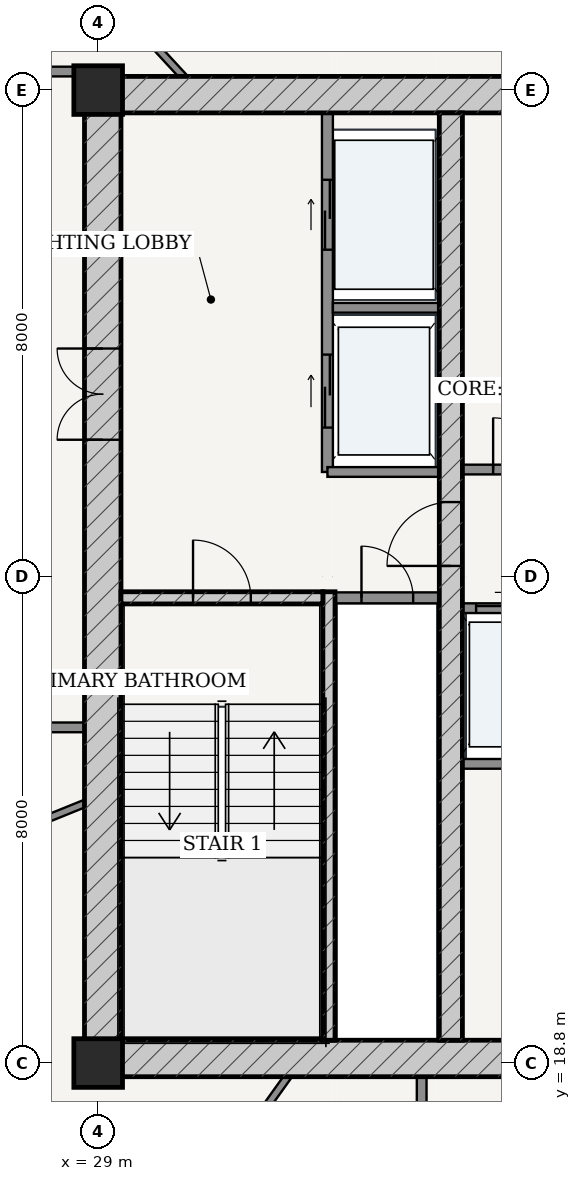
"""IFC4 building model, lengths in metres.
Left out: names, types, materials, properties, quantities, classifications, styles, units other than length and angle.
Written with IfcOpenShell. Run it as: python <this file> out.ifc"""

import sys

from ifc_helpers import new_model, si_unit, direction, frame, frame_2d, origin, origin_2d, place, context, subcontext, project, spatial, rectangle, extrude, source, transform, mapped, element, fill, save


model = new_model("IFC4")
c1 = context("Model", 3, precision=1e-05, world=origin(), true_north=direction((-0.2419218956, 0.970295726276)))
c2 = subcontext(c1, "Body", "Model", "MODEL_VIEW")
j1 = project(units=[si_unit("LENGTHUNIT", "METRE"), si_unit("PLANEANGLEUNIT", "RADIAN")], contexts=[c1])
p1 = place(None, origin())
s1 = spatial("IfcSite", under=j1, at=p1, CompositionType="ELEMENT")
p2 = place(p1, origin())
s2 = spatial("IfcBuilding", under=s1, at=p2, CompositionType="ELEMENT")
p3 = place(p2, frame((0.0, 0.0, 217.1)))
s3 = spatial("IfcBuildingStorey", under=s2, at=p3, CompositionType="ELEMENT", Elevation=217.1)
for number, where, z_axis, x_axis in (
    (1, (29.0, 18.8, 0.0), (0.0, 0.0, 1.0), (1.0, 0.0, 0.0)),
    (2, (29.0, 34.8, 0.0), (0.0, 0.0, 1.0), (1.0, 0.0, 0.0)),
):
    element("IfcColumn", number, at=place(p3, frame(where, z_axis=z_axis, x_axis=x_axis)), inside=s3, PredefinedType="COLUMN", context=c2, shape_type="SweptSolid", body=[
        extrude(rectangle(XDim=0.8, YDim=0.8, at=origin_2d()), origin(), (0.0, 0.0, 1.0), 3.7),
    ])
p4 = place(p3, frame((28.775, 18.875, 0.0), z_axis=(0.0, 0.0, 1.0), x_axis=(1.0, 0.0, 0.0)))
e3 = element("IfcWall", 3, at=p4, inside=s3, PredefinedType="SHEAR", context=c2, shape_type="SweptSolid", body=[
    extrude(rectangle(XDim=18.45, YDim=0.6, at=frame_2d((9.225, 0.0))), origin(), (0.0, 0.0, 1.0), 3.435),
])
p5 = place(p4, frame((7.46, 0.0, 0.0)))
e4 = element("IfcOpeningElement", 4, at=p5, cuts=e3, PredefinedType="OPENING", context=c2, shape_type="SweptSolid", body=[
    extrude(rectangle(XDim=0.85, YDim=2.1, at=frame_2d((0.425, 1.05))), frame((0.0, 0.31, 0.0), z_axis=(0.0, -1.0, 0.0), x_axis=(1.0, 0.0, 0.0)), (0.0, 0.0, 1.0), 0.62),
])
p6 = place(p4, frame((10.54, 0.0, 0.0)))
e5 = element("IfcOpeningElement", 5, at=p6, cuts=e3, PredefinedType="OPENING", context=c2, shape_type="SweptSolid", body=[
    extrude(rectangle(XDim=0.85, YDim=2.1, at=frame_2d((0.425, 1.05))), frame((0.0, 0.31, 0.0), z_axis=(0.0, -1.0, 0.0), x_axis=(1.0, 0.0, 0.0)), (0.0, 0.0, 1.0), 0.62),
])
p7 = place(p3, frame((28.775, 34.725, 0.0), z_axis=(0.0, 0.0, 1.0), x_axis=(1.0, 0.0, 0.0)))
e6 = element("IfcWall", 6, at=p7, inside=s3, PredefinedType="SHEAR", context=c2, shape_type="SweptSolid", body=[
    extrude(rectangle(XDim=18.45, YDim=0.6, at=frame_2d((9.225, 0.0))), origin(), (0.0, 0.0, 1.0), 3.435),
])
p8 = place(p3, frame((29.075, 19.175, 0.0), z_axis=(0.0, 0.0, 1.0), x_axis=(0.0, 1.0, 0.0)))
e7 = element("IfcWall", 7, at=p8, inside=s3, PredefinedType="SHEAR", context=c2, shape_type="SweptSolid", body=[
    extrude(rectangle(XDim=15.25, YDim=0.6, at=frame_2d((7.625, 0.0))), origin(), (0.0, 0.0, 1.0), 3.435),
])
p9 = place(p8, frame((9.875, 0.0, 0.0)))
e8 = element("IfcOpeningElement", 8, at=p9, cuts=e7, PredefinedType="OPENING", context=c2, shape_type="SweptSolid", body=[
    extrude(rectangle(XDim=1.5, YDim=2.2, at=frame_2d((0.75, 1.1))), frame((0.0, 0.31, 0.0), z_axis=(0.0, -1.0, 0.0), x_axis=(1.0, 0.0, 0.0)), (0.0, 0.0, 1.0), 0.62),
])
p10 = place(p3, frame((32.795, 19.175, 0.0), z_axis=(0.0, 0.0, 1.0), x_axis=(0.0, 1.0, 0.0)))
e9 = element("IfcWall", 9, at=p10, inside=s3, PredefinedType="SOLIDWALL", context=c2, shape_type="SweptSolid", body=[
    extrude(rectangle(XDim=7.375, YDim=0.2, at=frame_2d((3.688, 0.0))), origin(), (0.0, 0.0, 1.0), 3.435),
])
p11 = place(p3, frame((29.375, 26.45, 0.0), z_axis=(0.0, 0.0, 1.0), x_axis=(1.0, 0.0, 0.0)))
e10 = element("IfcWall", 10, at=p11, inside=s3, PredefinedType="SOLIDWALL", context=c2, shape_type="SweptSolid", body=[
    extrude(rectangle(XDim=3.32, YDim=0.2, at=frame_2d((1.66, 0.0))), origin(), (0.0, 0.0, 1.0), 3.435),
])
p12 = place(p11, frame((1.185, 0.0, 0.0)))
e11 = element("IfcOpeningElement", 11, at=p12, cuts=e10, PredefinedType="OPENING", context=c2, shape_type="SweptSolid", body=[
    extrude(rectangle(XDim=0.95, YDim=2.15, at=frame_2d((0.475, 1.075))), frame((0.0, 0.11, 0.0), z_axis=(0.0, -1.0, 0.0), x_axis=(1.0, 0.0, 0.0)), (0.0, 0.0, 1.0), 0.22),
])
p13 = place(p3, frame((34.8, 19.175, 0.0), z_axis=(0.0, 0.0, 1.0), x_axis=(0.0, 1.0, 0.0)))
e12 = element("IfcWall", 12, at=p13, inside=s3, PredefinedType="SHEAR", context=c2, shape_type="SweptSolid", body=[
    extrude(rectangle(XDim=15.25, YDim=0.38, at=frame_2d((7.625, 0.0))), origin(), (0.0, 0.0, 1.0), 3.435),
])
p14 = place(p13, frame((7.8, 0.0, 0.0)))
e13 = element("IfcOpeningElement", 13, at=p14, cuts=e12, PredefinedType="OPENING", context=c2, shape_type="SweptSolid", body=[
    extrude(rectangle(XDim=1.05, YDim=2.15, at=frame_2d((0.525, 1.075))), frame((0.0, 0.2, 0.0), z_axis=(0.0, -1.0, 0.0), x_axis=(1.0, 0.0, 0.0)), (0.0, 0.0, 1.0), 0.4),
])
p15 = place(p3, frame((32.9, 26.45, 0.0), z_axis=(0.0, 0.0, 1.0), x_axis=(1.0, 0.0, 0.0)))
e14 = element("IfcWall", 14, at=p15, inside=s3, PredefinedType="PARTITIONING", context=c2, shape_type="SweptSolid", body=[
    extrude(rectangle(XDim=1.71, YDim=0.18, at=frame_2d((0.855, 0.0))), origin(), (0.0, 0.0, 1.0), 3.435),
])
p16 = place(p15, frame((0.43, 0.0, 0.0)))
e15 = element("IfcOpeningElement", 15, at=p16, cuts=e14, PredefinedType="OPENING", context=c2, shape_type="SweptSolid", body=[
    extrude(rectangle(XDim=0.85, YDim=2.1, at=frame_2d((0.425, 1.05))), frame((0.0, 0.1, 0.0), z_axis=(0.0, -1.0, 0.0), x_axis=(1.0, 0.0, 0.0)), (0.0, 0.0, 1.0), 0.2),
])
p17 = place(p3, frame((32.77, 28.52, 0.0), z_axis=(0.0, 0.0, 1.0), x_axis=(0.0, 1.0, 0.0)))
e16 = element("IfcWall", 16, at=p17, inside=s3, PredefinedType="PARTITIONING", context=c2, shape_type="SweptSolid", body=[
    extrude(rectangle(XDim=5.905, YDim=0.18, at=frame_2d((2.953, 0.0))), origin(), (0.0, 0.0, 1.0), 3.435),
])
p18 = place(p17, frame((3.655, 0.0, 0.0)))
e17 = element("IfcOpeningElement", 17, at=p18, cuts=e16, PredefinedType="OPENING", context=c2, shape_type="SweptSolid", body=[
    extrude(rectangle(XDim=1.15, YDim=2.2, at=frame_2d((0.575, 1.1))), frame((0.0, 0.1, 0.0), z_axis=(0.0, -1.0, 0.0), x_axis=(1.0, 0.0, 0.0)), (0.0, 0.0, 1.0), 0.2),
])
p19 = place(p17, frame((0.73, 0.0, 0.0)))
e18 = element("IfcOpeningElement", 18, at=p19, cuts=e16, PredefinedType="OPENING", context=c2, shape_type="SweptSolid", body=[
    extrude(rectangle(XDim=1.2, YDim=2.25, at=frame_2d((0.6, 1.125))), frame((0.0, 0.1, 0.0), z_axis=(0.0, -1.0, 0.0), x_axis=(1.0, 0.0, 0.0)), (0.0, 0.0, 1.0), 0.2),
])
p20 = place(p3, frame((32.86, 31.22, 0.0), z_axis=(0.0, 0.0, 1.0), x_axis=(1.0, 0.0, 0.0)))
e19 = element("IfcWall", 19, at=p20, inside=s3, PredefinedType="PARTITIONING", context=c2, shape_type="SweptSolid", body=[
    extrude(rectangle(XDim=1.75, YDim=0.16, at=frame_2d((0.875, 0.0))), origin(), (0.0, 0.0, 1.0), 3.435),
])
p21 = place(p3, frame((32.77, 28.52, 0.0), z_axis=(0.0, 0.0, 1.0), x_axis=(1.0, 0.0, 0.0)))
e20 = element("IfcWall", 20, at=p21, inside=s3, PredefinedType="PARTITIONING", context=c2, shape_type="SweptSolid", body=[
    extrude(rectangle(XDim=1.84, YDim=0.16, at=frame_2d((0.92, 0.0))), origin(), (0.0, 0.0, 1.0), 3.435),
])
p22 = place(p3, frame((34.99, 28.56, 0.0), z_axis=(0.0, 0.0, 1.0), x_axis=(1.0, 0.0, 0.0)))
e21 = element("IfcWall", 21, at=p22, inside=s3, PredefinedType="PARTITIONING", context=c2, shape_type="SweptSolid", body=[
    extrude(rectangle(XDim=6.02, YDim=0.16, at=frame_2d((3.01, 0.0))), origin(), (0.0, 0.0, 1.0), 3.435),
])
p23 = place(p22, frame((0.505, 0.0, 0.0)))
e22 = element("IfcOpeningElement", 22, at=p23, cuts=e21, PredefinedType="OPENING", context=c2, shape_type="SweptSolid", body=[
    extrude(rectangle(XDim=0.85, YDim=2.1, at=frame_2d((0.425, 1.05))), frame((0.0, 0.09, 0.0), z_axis=(0.0, -1.0, 0.0), x_axis=(1.0, 0.0, 0.0)), (0.0, 0.0, 1.0), 0.18),
])
p24 = place(p22, frame((2.58, 0.0, 0.0)))
e23 = element("IfcOpeningElement", 23, at=p24, cuts=e21, PredefinedType="OPENING", context=c2, shape_type="SweptSolid", body=[
    extrude(rectangle(XDim=0.86, YDim=2.1, at=frame_2d((0.43, 1.05))), frame((0.0, 0.09, 0.0), z_axis=(0.0, -1.0, 0.0), x_axis=(1.0, 0.0, 0.0)), (0.0, 0.0, 1.0), 0.18),
])
p25 = place(p22, frame((4.665, 0.0, 0.0)))
e24 = element("IfcOpeningElement", 24, at=p25, cuts=e21, PredefinedType="OPENING", context=c2, shape_type="SweptSolid", body=[
    extrude(rectangle(XDim=0.85, YDim=2.1, at=frame_2d((0.425, 1.05))), frame((0.0, 0.09, 0.0), z_axis=(0.0, -1.0, 0.0), x_axis=(1.0, 0.0, 0.0)), (0.0, 0.0, 1.0), 0.18),
])
p26 = place(p3, frame((34.99, 26.28, 0.0), z_axis=(0.0, 0.0, 1.0), x_axis=(1.0, 0.0, 0.0)))
e25 = element("IfcWall", 25, at=p26, inside=s3, PredefinedType="PARTITIONING", context=c2, shape_type="SweptSolid", body=[
    extrude(rectangle(XDim=6.02, YDim=0.16, at=frame_2d((3.01, 0.0))), origin(), (0.0, 0.0, 1.0), 3.435),
])
p27 = place(p26, frame((0.225, 0.0, 0.0)))
e26 = element("IfcOpeningElement", 26, at=p27, cuts=e25, PredefinedType="OPENING", context=c2, shape_type="SweptSolid", body=[
    extrude(rectangle(XDim=1.1, YDim=2.2, at=frame_2d((0.55, 1.1))), frame((0.0, 0.09, 0.0), z_axis=(0.0, -1.0, 0.0), x_axis=(1.0, 0.0, 0.0)), (0.0, 0.0, 1.0), 0.18),
])
p28 = place(p26, frame((1.705, 0.0, 0.0)))
e27 = element("IfcOpeningElement", 27, at=p28, cuts=e25, PredefinedType="OPENING", context=c2, shape_type="SweptSolid", body=[
    extrude(rectangle(XDim=1.1, YDim=2.2, at=frame_2d((0.55, 1.1))), frame((0.0, 0.09, 0.0), z_axis=(0.0, -1.0, 0.0), x_axis=(1.0, 0.0, 0.0)), (0.0, 0.0, 1.0), 0.18),
])
p29 = place(p3, frame((34.99, 23.72, 0.0), z_axis=(0.0, 0.0, 1.0), x_axis=(1.0, 0.0, 0.0)))
e28 = element("IfcWall", 28, at=p29, inside=s3, PredefinedType="PARTITIONING", context=c2, shape_type="SweptSolid", body=[
    extrude(rectangle(XDim=6.02, YDim=0.16, at=frame_2d((3.01, 0.0))), origin(), (0.0, 0.0, 1.0), 3.435),
])
for number, where, z_axis, x_axis in (
    (29, (26.845, 35.105, 0.0), (0.0, 0.0, 1.0), (1.0, 0.0, 0.0)),
    (30, (26.845, 24.32, 0.0), (0.0, 0.0, 1.0), (1.0, 0.0, 0.0)),
):
    element("IfcWall", number, at=place(p3, frame(where, z_axis=z_axis, x_axis=x_axis)), inside=s3, PredefinedType="PARTITIONING", context=c2, shape_type="SweptSolid", body=[
        extrude(rectangle(XDim=1.93, YDim=0.16, at=frame_2d((0.965, 0.0))), origin(), (0.0, 0.0, 1.0), 3.435),
    ])
p30 = place(p3, frame((34.32, 16.725, 0.0), z_axis=(0.0, 0.0, 1.0), x_axis=(0.0, 1.0, 0.0)))
e31 = element("IfcWall", 31, at=p30, inside=s3, PredefinedType="PARTITIONING", context=c2, shape_type="SweptSolid", body=[
    extrude(rectangle(XDim=1.85, YDim=0.16, at=frame_2d((0.925, 0.0))), origin(), (0.0, 0.0, 1.0), 3.435),
])
p31 = place(p30, frame((0.435, 0.0, 0.0)))
e32 = element("IfcOpeningElement", 32, at=p31, cuts=e31, PredefinedType="OPENING", context=c2, shape_type="SweptSolid", body=[
    extrude(rectangle(XDim=0.98, YDim=2.2, at=frame_2d((0.49, 1.1))), frame((0.0, 0.09, 0.0), z_axis=(0.0, -1.0, 0.0), x_axis=(1.0, 0.0, 0.0)), (0.0, 0.0, 1.0), 0.18),
])
p32 = place(p3, frame((30.396, 35.026, 0.0), z_axis=(0.0, 0.0, 1.0), x_axis=(-0.678759446058, 0.734360684124, 0.0)))
e33 = element("IfcWall", 33, at=p32, inside=s3, PredefinedType="PARTITIONING", context=c2, shape_type="SweptSolid", body=[
    extrude(rectangle(XDim=3.912, YDim=0.12, at=frame_2d((1.956, 0.0))), origin(), (0.0, 0.0, 1.0), 2.951),
])
p33 = place(p3, frame((28.775, 23.067, 0.0), z_axis=(0.0, 0.0, 1.0), x_axis=(-0.926976443277, -0.375119545757, 0.0)))
e34 = element("IfcWall", 34, at=p33, inside=s3, PredefinedType="PARTITIONING", context=c2, shape_type="SweptSolid", body=[
    extrude(rectangle(XDim=4.23, YDim=0.12, at=frame_2d((2.115, 0.0))), origin(), (0.0, 0.0, 1.0), 3.435),
])
p34 = place(p33, frame((1.685, 0.0, 0.0)))
e35 = element("IfcOpeningElement", 35, at=p34, cuts=e34, PredefinedType="OPENING", context=c2, shape_type="SweptSolid", body=[
    extrude(rectangle(XDim=0.86, YDim=2.15, at=frame_2d((0.43, 1.075))), frame((0.0, 0.07, 0.0), z_axis=(0.0, -1.0, 0.0), x_axis=(1.0, 0.0, 0.0)), (0.0, 0.0, 1.0), 0.14),
])
p35 = place(p3, frame((32.117, 18.575, 0.0), z_axis=(0.0, 0.0, 1.0), x_axis=(-0.581813438478, -0.813322274874, 0.0)))
e36 = element("IfcWall", 36, at=p35, inside=s3, PredefinedType="PARTITIONING", context=c2, shape_type="SweptSolid", body=[
    extrude(rectangle(XDim=3.331, YDim=0.12, at=frame_2d((1.666, 0.0))), origin(), (0.0, 0.0, 1.0), 3.435),
])
p36 = place(p35, frame((1.216, 0.0, 0.0)))
e37 = element("IfcOpeningElement", 37, at=p36, cuts=e36, PredefinedType="OPENING", context=c2, shape_type="SweptSolid", body=[
    extrude(rectangle(XDim=0.9, YDim=2.15, at=frame_2d((0.45, 1.075))), frame((0.0, 0.07, 0.0), z_axis=(0.0, -1.0, 0.0), x_axis=(1.0, 0.0, 0.0)), (0.0, 0.0, 1.0), 0.14),
])
m1 = source(origin(), c2, "Body", "SweptSolid", [
    extrude(rectangle(XDim=1.5, YDim=2.2, at=frame_2d((0.75, 1.1))), frame((0.0, 0.025, 0.0), z_axis=(0.0, -1.0, 0.0), x_axis=(1.0, 0.0, 0.0)), (0.0, 0.0, 1.0), 0.05),
])
p37 = place(p9, origin())
e38 = element("IfcDoor", 38, at=p37, inside=s3, OperationType="DOUBLE_DOOR_SINGLE_SWING", PredefinedType="DOOR", context=c2, shape_type="MappedRepresentation", body=[
    mapped(m1, transform((0.0, 0.0, 0.0), scale=1.0)),
])
fill(e8, e38)
m2 = source(origin(), c2, "Body", "SweptSolid", [
    extrude(rectangle(XDim=1.05, YDim=2.15, at=frame_2d((0.525, 1.075))), frame((0.0, 0.025, 0.0), z_axis=(0.0, -1.0, 0.0), x_axis=(1.0, 0.0, 0.0)), (0.0, 0.0, 1.0), 0.05),
])
p38 = place(p14, origin())
e39 = element("IfcDoor", 39, at=p38, inside=s3, OperationType="SINGLE_SWING_LEFT", PredefinedType="DOOR", context=c2, shape_type="MappedRepresentation", body=[
    mapped(m2, transform((0.0, 0.0, 0.0), scale=1.0)),
])
fill(e13, e39)
m3 = source(origin(), c2, "Body", "SweptSolid", [
    extrude(rectangle(XDim=0.95, YDim=2.15, at=frame_2d((0.475, 1.075))), frame((0.0, 0.025, 0.0), z_axis=(0.0, -1.0, 0.0), x_axis=(1.0, 0.0, 0.0)), (0.0, 0.0, 1.0), 0.05),
])
p39 = place(p12, origin())
e40 = element("IfcDoor", 40, at=p39, inside=s3, OperationType="SINGLE_SWING_LEFT", PredefinedType="DOOR", context=c2, shape_type="MappedRepresentation", body=[
    mapped(m3, transform((0.0, 0.0, 0.0), scale=1.0)),
])
fill(e11, e40)
m4 = source(origin(), c2, "Body", "SweptSolid", [
    extrude(rectangle(XDim=0.85, YDim=2.1, at=frame_2d((0.425, 1.05))), frame((0.0, 0.025, 0.0), z_axis=(0.0, -1.0, 0.0), x_axis=(1.0, 0.0, 0.0)), (0.0, 0.0, 1.0), 0.05),
])
p40 = place(p16, origin())
e41 = element("IfcDoor", 41, at=p40, inside=s3, OperationType="SINGLE_SWING_LEFT", PredefinedType="DOOR", context=c2, shape_type="MappedRepresentation", body=[
    mapped(m4, transform((0.0, 0.0, 0.0), scale=1.0)),
])
fill(e15, e41)
p41 = place(p23, origin())
e42 = element("IfcDoor", 42, at=p41, inside=s3, OperationType="SINGLE_SWING_LEFT", PredefinedType="DOOR", context=c2, shape_type="MappedRepresentation", body=[
    mapped(m4, transform((0.0, 0.0, 0.0), scale=1.0)),
])
fill(e22, e42)
m5 = source(origin(), c2, "Body", "SweptSolid", [
    extrude(rectangle(XDim=1.15, YDim=2.2, at=frame_2d((0.575, 1.1))), frame((0.0, 0.025, 0.0), z_axis=(0.0, -1.0, 0.0), x_axis=(1.0, 0.0, 0.0)), (0.0, 0.0, 1.0), 0.05),
])
p42 = place(p18, origin())
e43 = element("IfcDoor", 43, at=p42, inside=s3, OperationType="DOUBLE_DOOR_SLIDING", PredefinedType="DOOR", context=c2, shape_type="MappedRepresentation", body=[
    mapped(m5, transform((0.0, 0.0, 0.0), scale=1.0)),
])
fill(e17, e43)
m6 = source(origin(), c2, "Body", "SweptSolid", [
    extrude(rectangle(XDim=1.2, YDim=2.25, at=frame_2d((0.6, 1.125))), frame((0.0, 0.025, 0.0), z_axis=(0.0, -1.0, 0.0), x_axis=(1.0, 0.0, 0.0)), (0.0, 0.0, 1.0), 0.05),
])
p43 = place(p19, origin())
e44 = element("IfcDoor", 44, at=p43, inside=s3, OperationType="DOUBLE_DOOR_SLIDING", PredefinedType="DOOR", context=c2, shape_type="MappedRepresentation", body=[
    mapped(m6, transform((0.0, 0.0, 0.0), scale=1.0)),
])
fill(e18, e44)
m7 = source(origin(), c2, "Body", "SweptSolid", [
    extrude(rectangle(XDim=1.1, YDim=2.2, at=frame_2d((0.55, 1.1))), frame((0.0, 0.025, 0.0), z_axis=(0.0, -1.0, 0.0), x_axis=(1.0, 0.0, 0.0)), (0.0, 0.0, 1.0), 0.05),
])
p44 = place(p27, origin())
e45 = element("IfcDoor", 45, at=p44, inside=s3, OperationType="DOUBLE_DOOR_SLIDING", PredefinedType="DOOR", context=c2, shape_type="MappedRepresentation", body=[
    mapped(m7, transform((0.0, 0.0, 0.0), scale=1.0)),
])
fill(e26, e45)
save(model, sys.argv[1])
